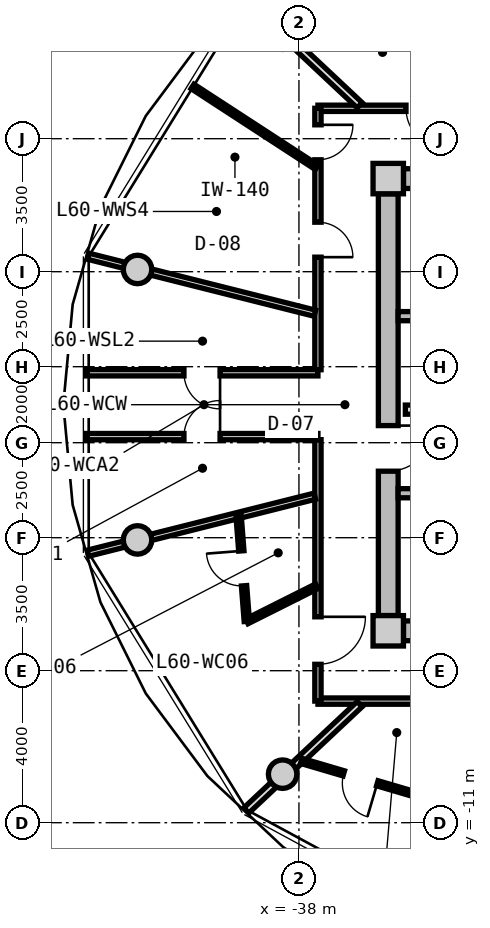
"""IFC4 building model, lengths in metres.
Left out: names, types, materials, properties, quantities, classifications, styles, units other than length and angle.
Written with IfcOpenShell. Run it as: python <this file> out.ifc"""

import sys

from ifc_helpers import new_model, si_unit, direction, frame, frame_2d, origin, origin_2d, place, context, subcontext, project, spatial, rectangle, circle, extrude, source, transform, mapped, element, fill, save


model = new_model("IFC4")
c1 = context("Model", 3, precision=1e-05, world=origin(), true_north=direction((0.0, 1.0)))
c2 = subcontext(c1, "Body", "Model", "MODEL_VIEW")
j1 = project(units=[si_unit("LENGTHUNIT", "METRE"), si_unit("PLANEANGLEUNIT", "RADIAN")], contexts=[c1])
p1 = place(None, origin())
s1 = spatial("IfcSite", under=j1, at=p1, CompositionType="ELEMENT")
p2 = place(p1, origin())
s2 = spatial("IfcBuilding", under=s1, at=p2, CompositionType="ELEMENT")
p3 = place(p2, frame((0.0, 0.0, 193.7)))
s3 = spatial("IfcBuildingStorey", under=s2, at=p3, CompositionType="ELEMENT", Elevation=193.7)
m1 = source(origin(), c2, "Body", "SweptSolid", [
    extrude(rectangle(XDim=0.8, YDim=0.8, at=origin_2d()), origin(), (0.0, 0.0, 1.0), 3.05),
])
for number, where, z_axis, x_axis in (
    (1, (-35.65, -5.95, 0.0), (0.0, 0.0, 1.0), (1.0, 0.0, 0.0)),
    (2, (-35.65, 5.95, 0.0), (0.0, 0.0, 1.0), (1.0, 0.0, 0.0)),
):
    element("IfcColumn", number, at=place(p3, frame(where, z_axis=z_axis, x_axis=x_axis)), inside=s3, PredefinedType="COLUMN", context=c2, shape_type="MappedRepresentation", body=[
        mapped(m1, transform((0.0, 0.0, 0.0), x_axis=(1.0, 0.0, 0.0), y_axis=(0.0, 1.0, 0.0), z_axis=(0.0, 0.0, 1.0), scale=1.0)),
    ])
m2 = source(origin(), c2, "Body", "SweptSolid", [
    extrude(rectangle(XDim=14.5, YDim=0.52, at=frame_2d((7.25, 0.0))), origin(), (0.0, 0.0, 1.0), 2.81),
])
for number, where, z_axis, x_axis in (
    (3, (-35.25, 5.95, 0.0), (0.0, 0.0, 1.0), (1.0, 0.0, 0.0)),
    (4, (-20.75, -5.95, 0.0), (0.0, 0.0, 1.0), (-1.0, 0.0, 0.0)),
):
    element("IfcWall", number, at=place(p3, frame(where, z_axis=z_axis, x_axis=x_axis)), inside=s3, PredefinedType="SHEAR", context=c2, shape_type="MappedRepresentation", body=[
        mapped(m2, transform((0.0, 0.0, 0.0), x_axis=(1.0, 0.0, 0.0), y_axis=(0.0, 1.0, 0.0), z_axis=(0.0, 0.0, 1.0), scale=1.0)),
    ])
m3 = source(origin(), c2, "Body", "SweptSolid", [
    extrude(rectangle(XDim=11.1, YDim=0.52, at=frame_2d((5.55, 0.0))), origin(), (0.0, 0.0, 1.0), 2.81),
])
p4 = place(p3, frame((-35.65, -5.55, 0.0), z_axis=(0.0, 0.0, 1.0), x_axis=(0.0, 1.0, 0.0)))
e5 = element("IfcWall", 5, at=p4, inside=s3, PredefinedType="SHEAR", context=c2, shape_type="MappedRepresentation", body=[
    mapped(m3, transform((0.0, 0.0, 0.0), x_axis=(1.0, 0.0, 0.0), y_axis=(0.0, 1.0, 0.0), z_axis=(0.0, 0.0, 1.0), scale=1.0)),
])
p5 = place(p4, frame((3.8, 0.0, 0.0)))
e6 = element("IfcOpeningElement", 6, at=p5, cuts=e5, PredefinedType="OPENING", context=c2, shape_type="SweptSolid", body=[
    extrude(rectangle(XDim=1.2, YDim=2.15, at=frame_2d((0.6, 1.075))), frame((0.0, 0.27, 0.0), z_axis=(0.0, -1.0, 0.0), x_axis=(1.0, 0.0, 0.0)), (0.0, 0.0, 1.0), 0.54),
])
m4 = source(origin(), c2, "Body", "SweptSolid", [
    extrude(circle(Radius=0.375, at=origin_2d()), origin(), (0.0, 0.0, 1.0), 3.05),
])
for number, where, z_axis, x_axis in (
    (7, (-42.247, 3.559, 0.0), (0.0, 0.0, 1.0), (1.0, 0.0, 0.0)),
    (8, (-42.247, -3.559, 0.0), (0.0, 0.0, 1.0), (1.0, 0.0, 0.0)),
    (9, (-38.43, -9.723, 0.0), (0.0, 0.0, 1.0), (1.0, 0.0, 0.0)),
):
    element("IfcColumn", number, at=place(p3, frame(where, z_axis=z_axis, x_axis=x_axis)), inside=s3, PredefinedType="COLUMN", context=c2, shape_type="MappedRepresentation", body=[
        mapped(m4, transform((0.0, 0.0, 0.0), x_axis=(1.0, 0.0, 0.0), y_axis=(0.0, 1.0, 0.0), z_axis=(0.0, 0.0, 1.0), scale=1.0)),
    ])
m5 = source(origin(), c2, "Body", "SweptSolid", [
    extrude(rectangle(XDim=7.93, YDim=0.24, at=frame_2d((3.965, 0.0))), origin(), (0.0, 0.0, 1.0), 2.81),
])
p6 = place(p3, frame((-35.39, 2.33, 0.0), z_axis=(0.0, 0.0, 1.0), x_axis=(1.0, 0.0, 0.0)))
e10 = element("IfcWall", 10, at=p6, inside=s3, PredefinedType="PARTITIONING", context=c2, shape_type="MappedRepresentation", body=[
    mapped(m5, transform((0.0, 0.0, 0.0), x_axis=(1.0, 0.0, 0.0), y_axis=(0.0, 1.0, 0.0), z_axis=(0.0, 0.0, 1.0), scale=1.0)),
])
p7 = place(p3, frame((-35.39, -2.33, 0.0), z_axis=(0.0, 0.0, 1.0), x_axis=(1.0, 0.0, 0.0)))
e11 = element("IfcWall", 11, at=p7, inside=s3, PredefinedType="PARTITIONING", context=c2, shape_type="MappedRepresentation", body=[
    mapped(m5, transform((0.0, 0.0, 0.0), x_axis=(1.0, 0.0, 0.0), y_axis=(0.0, 1.0, 0.0), z_axis=(0.0, 0.0, 1.0), scale=1.0)),
])
p8 = place(p7, frame((1.05, 0.0, 0.0)))
e12 = element("IfcOpeningElement", 12, at=p8, cuts=e11, PredefinedType="OPENING", context=c2, shape_type="SweptSolid", body=[
    extrude(rectangle(XDim=1.1, YDim=2.15, at=frame_2d((0.55, 1.075))), frame((0.0, 0.13, 0.0), z_axis=(0.0, -1.0, 0.0), x_axis=(1.0, 0.0, 0.0)), (0.0, 0.0, 1.0), 0.26),
])
m6 = source(origin(), c2, "Body", "SweptSolid", [
    extrude(rectangle(XDim=7.62, YDim=0.24, at=frame_2d((3.81, 0.0))), origin(), (0.0, 0.0, 1.0), 2.795),
])
p9 = place(p3, frame((-35.2, -0.13, 0.0), z_axis=(0.0, 0.0, 1.0), x_axis=(1.0, 0.0, 0.0)))
e13 = element("IfcWall", 13, at=p9, inside=s3, PredefinedType="PARTITIONING", context=c2, shape_type="MappedRepresentation", body=[
    mapped(m6, transform((0.0, 0.0, 0.0), x_axis=(1.0, 0.0, 0.0), y_axis=(0.0, 1.0, 0.0), z_axis=(0.0, 0.0, 1.0), scale=1.0)),
])
p10 = place(p9, frame((6.22, 0.0, 0.0)))
e14 = element("IfcOpeningElement", 14, at=p10, cuts=e13, PredefinedType="OPENING", context=c2, shape_type="SweptSolid", body=[
    extrude(rectangle(XDim=1.0, YDim=2.1, at=frame_2d((0.5, 1.05))), frame((0.0, 0.13, 0.0), z_axis=(0.0, -1.0, 0.0), x_axis=(1.0, 0.0, 0.0)), (0.0, 0.0, 1.0), 0.26),
])
p11 = place(p9, frame((2.4, 0.0, 0.0)))
e15 = element("IfcOpeningElement", 15, at=p11, cuts=e13, PredefinedType="OPENING", context=c2, shape_type="SweptSolid", body=[
    extrude(rectangle(XDim=1.0, YDim=2.1, at=frame_2d((0.5, 1.05))), frame((0.0, 0.13, 0.0), z_axis=(0.0, -1.0, 0.0), x_axis=(1.0, 0.0, 0.0)), (0.0, 0.0, 1.0), 0.26),
])
m7 = source(origin(), c2, "Body", "SweptSolid", [
    extrude(rectangle(XDim=8.58, YDim=0.165, at=frame_2d((4.29, 0.0))), origin(), (0.0, 0.0, 1.0), 2.795),
])
p12 = place(p3, frame((-37.5, 7.8, 0.0), z_axis=(0.0, 0.0, 1.0), x_axis=(1.0, 0.0, 0.0)))
e16 = element("IfcWall", 16, at=p12, inside=s3, PredefinedType="PARTITIONING", context=c2, shape_type="MappedRepresentation", body=[
    mapped(m7, transform((0.0, 0.0, 0.0), x_axis=(1.0, 0.0, 0.0), y_axis=(0.0, 1.0, 0.0), z_axis=(0.0, 0.0, 1.0), scale=1.0)),
])
p13 = place(p12, frame((5.408, 0.0, 0.0)))
e17 = element("IfcOpeningElement", 17, at=p13, cuts=e16, PredefinedType="OPENING", context=c2, shape_type="SweptSolid", body=[
    extrude(rectangle(XDim=1.05, YDim=2.15, at=frame_2d((0.525, 1.075))), frame((0.0, 0.093, 0.0), z_axis=(0.0, -1.0, 0.0), x_axis=(1.0, 0.0, 0.0)), (0.0, 0.0, 1.0), 0.185),
])
p14 = place(p12, frame((2.317, 0.0, 0.0)))
e18 = element("IfcOpeningElement", 18, at=p14, cuts=e16, PredefinedType="OPENING", context=c2, shape_type="SweptSolid", body=[
    extrude(rectangle(XDim=1.05, YDim=2.15, at=frame_2d((0.525, 1.075))), frame((0.0, 0.093, 0.0), z_axis=(0.0, -1.0, 0.0), x_axis=(1.0, 0.0, 0.0)), (0.0, 0.0, 1.0), 0.185),
])
m8 = source(origin(), c2, "Body", "SweptSolid", [
    extrude(rectangle(XDim=19.0, YDim=0.165, at=frame_2d((9.5, 0.0))), origin(), (0.0, 0.0, 1.0), 2.795),
])
p15 = place(p3, frame((-18.5, -7.8, 0.0), z_axis=(0.0, 0.0, 1.0), x_axis=(-1.0, 0.0, 0.0)))
e19 = element("IfcWall", 19, at=p15, inside=s3, PredefinedType="PARTITIONING", context=c2, shape_type="MappedRepresentation", body=[
    mapped(m8, transform((0.0, 0.0, 0.0), x_axis=(1.0, 0.0, 0.0), y_axis=(0.0, 1.0, 0.0), z_axis=(0.0, 0.0, 1.0), scale=1.0)),
])
p16 = place(p15, frame((12.569, 0.0, 0.0)))
e20 = element("IfcOpeningElement", 20, at=p16, cuts=e19, PredefinedType="OPENING", context=c2, shape_type="SweptSolid", body=[
    extrude(rectangle(XDim=1.25, YDim=2.2, at=frame_2d((0.625, 1.1))), frame((0.0, 0.093, 0.0), z_axis=(0.0, -1.0, 0.0), x_axis=(1.0, 0.0, 0.0)), (0.0, 0.0, 1.0), 0.185),
])
p17 = place(p15, frame((7.868, 0.0, 0.0)))
e21 = element("IfcOpeningElement", 21, at=p17, cuts=e19, PredefinedType="OPENING", context=c2, shape_type="SweptSolid", body=[
    extrude(rectangle(XDim=1.25, YDim=2.2, at=frame_2d((0.625, 1.1))), frame((0.0, 0.093, 0.0), z_axis=(0.0, -1.0, 0.0), x_axis=(1.0, 0.0, 0.0)), (0.0, 0.0, 1.0), 0.185),
])
p18 = place(p15, frame((3.559, 0.0, 0.0)))
e22 = element("IfcOpeningElement", 22, at=p18, cuts=e19, PredefinedType="OPENING", context=c2, shape_type="SweptSolid", body=[
    extrude(rectangle(XDim=1.25, YDim=2.2, at=frame_2d((0.625, 1.1))), frame((0.0, 0.093, 0.0), z_axis=(0.0, -1.0, 0.0), x_axis=(1.0, 0.0, 0.0)), (0.0, 0.0, 1.0), 0.185),
])
m9 = source(origin(), c2, "Body", "SweptSolid", [
    extrude(rectangle(XDim=6.88, YDim=0.165, at=frame_2d((3.44, 0.0))), origin(), (0.0, 0.0, 1.0), 2.795),
])
p19 = place(p3, frame((-37.5, -7.8, 0.0), z_axis=(0.0, 0.0, 1.0), x_axis=(0.0, 1.0, 0.0)))
e23 = element("IfcWall", 23, at=p19, inside=s3, PredefinedType="PARTITIONING", context=c2, shape_type="MappedRepresentation", body=[
    mapped(m9, transform((0.0, 0.0, 0.0), x_axis=(1.0, 0.0, 0.0), y_axis=(0.0, 1.0, 0.0), z_axis=(0.0, 0.0, 1.0), scale=1.0)),
])
p20 = place(p19, frame((0.968, 0.0, 0.0)))
e24 = element("IfcOpeningElement", 24, at=p20, cuts=e23, PredefinedType="OPENING", context=c2, shape_type="SweptSolid", body=[
    extrude(rectangle(XDim=1.25, YDim=2.2, at=frame_2d((0.625, 1.1))), frame((0.0, 0.093, 0.0), z_axis=(0.0, -1.0, 0.0), x_axis=(1.0, 0.0, 0.0)), (0.0, 0.0, 1.0), 0.185),
])
p21 = place(p3, frame((-37.5, 0.92, 0.0), z_axis=(0.0, 0.0, 1.0), x_axis=(0.0, 1.0, 0.0)))
e25 = element("IfcWall", 25, at=p21, inside=s3, PredefinedType="PARTITIONING", context=c2, shape_type="MappedRepresentation", body=[
    mapped(m9, transform((0.0, 0.0, 0.0), x_axis=(1.0, 0.0, 0.0), y_axis=(0.0, 1.0, 0.0), z_axis=(0.0, 0.0, 1.0), scale=1.0)),
])
p22 = place(p21, frame((5.525, 0.0, 0.0)))
e26 = element("IfcOpeningElement", 26, at=p22, cuts=e25, PredefinedType="OPENING", context=c2, shape_type="SweptSolid", body=[
    extrude(rectangle(XDim=0.92, YDim=2.1, at=frame_2d((0.46, 1.05))), frame((0.0, 0.093, 0.0), z_axis=(0.0, -1.0, 0.0), x_axis=(1.0, 0.0, 0.0)), (0.0, 0.0, 1.0), 0.185),
])
p23 = place(p21, frame((2.962, 0.0, 0.0)))
e27 = element("IfcOpeningElement", 27, at=p23, cuts=e25, PredefinedType="OPENING", context=c2, shape_type="SweptSolid", body=[
    extrude(rectangle(XDim=0.92, YDim=2.1, at=frame_2d((0.46, 1.05))), frame((0.0, 0.093, 0.0), z_axis=(0.0, -1.0, 0.0), x_axis=(1.0, 0.0, 0.0)), (0.0, 0.0, 1.0), 0.185),
])
m10 = source(origin(), c2, "Body", "SweptSolid", [
    extrude(rectangle(XDim=6.157, YDim=0.165, at=frame_2d((3.079, 0.0))), origin(), (0.0, 0.0, 1.0), 2.395),
])
for number, where, z_axis, x_axis in (
    (28, (-37.58, 2.407, 0.0), (0.0, 0.0, 1.0), (-0.97, 0.244, 0.0)),
    (29, (-37.58, -2.407, 0.0), (0.0, 0.0, 1.0), (-0.97, -0.244, 0.0)),
):
    element("IfcWall", number, at=place(p3, frame(where, z_axis=z_axis, x_axis=x_axis)), inside=s3, PredefinedType="PARTITIONING", context=c2, shape_type="MappedRepresentation", body=[
        mapped(m10, transform((0.0, 0.0, 0.0), x_axis=(1.0, 0.0, 0.0), y_axis=(0.0, 1.0, 0.0), z_axis=(0.0, 0.0, 1.0), scale=1.0)),
    ])
m11 = source(origin(), c2, "Body", "SweptSolid", [
    extrude(rectangle(XDim=6.101, YDim=0.165, at=frame_2d((3.051, 0.0))), origin(), (0.0, 0.0, 1.0), 2.795),
])
p24 = place(p3, frame((-43.601, 0.84, 0.0), z_axis=(0.0, 0.0, 1.0), x_axis=(1.0, 0.0, 0.0)))
e30 = element("IfcWall", 30, at=p24, inside=s3, PredefinedType="PARTITIONING", context=c2, shape_type="MappedRepresentation", body=[
    mapped(m11, transform((0.0, 0.0, 0.0), x_axis=(1.0, 0.0, 0.0), y_axis=(0.0, 1.0, 0.0), z_axis=(0.0, 0.0, 1.0), scale=1.0)),
])
p25 = place(p24, frame((2.576, 0.0, 0.0)))
e31 = element("IfcOpeningElement", 31, at=p25, cuts=e30, PredefinedType="OPENING", context=c2, shape_type="SweptSolid", body=[
    extrude(rectangle(XDim=0.95, YDim=2.1, at=frame_2d((0.475, 1.05))), frame((0.0, 0.093, 0.0), z_axis=(0.0, -1.0, 0.0), x_axis=(1.0, 0.0, 0.0)), (0.0, 0.0, 1.0), 0.185),
])
p26 = place(p3, frame((-37.5, -0.84, 0.0), z_axis=(0.0, 0.0, 1.0), x_axis=(-1.0, 0.0, 0.0)))
e32 = element("IfcWall", 32, at=p26, inside=s3, PredefinedType="PARTITIONING", context=c2, shape_type="MappedRepresentation", body=[
    mapped(m11, transform((0.0, 0.0, 0.0), x_axis=(1.0, 0.0, 0.0), y_axis=(0.0, 1.0, 0.0), z_axis=(0.0, 0.0, 1.0), scale=1.0)),
])
p27 = place(p26, frame((2.576, 0.0, 0.0)))
e33 = element("IfcOpeningElement", 33, at=p27, cuts=e32, PredefinedType="OPENING", context=c2, shape_type="SweptSolid", body=[
    extrude(rectangle(XDim=0.95, YDim=2.1, at=frame_2d((0.475, 1.05))), frame((0.0, 0.093, 0.0), z_axis=(0.0, -1.0, 0.0), x_axis=(1.0, 0.0, 0.0)), (0.0, 0.0, 1.0), 0.185),
])
m12 = source(origin(), c2, "Body", "SweptSolid", [
    extrude(rectangle(XDim=4.089, YDim=0.19, at=frame_2d((2.044, 0.0))), origin(), (0.0, 0.0, 1.0), 2.395),
])
p28 = place(p3, frame((-36.402, 7.88, 0.0), z_axis=(0.0, 0.0, 1.0), x_axis=(-0.729401273609, 0.684086092577, 0.0)))
e34 = element("IfcWall", 34, at=p28, inside=s3, PredefinedType="PARTITIONING", context=c2, shape_type="MappedRepresentation", body=[
    mapped(m12, transform((0.0, 0.0, 0.0), x_axis=(1.0, 0.0, 0.0), y_axis=(0.0, 1.0, 0.0), z_axis=(0.0, 0.0, 1.0), scale=1.0)),
])
m13 = source(origin(), c2, "Body", "SweptSolid", [
    extrude(rectangle(XDim=5.652, YDim=0.19, at=frame_2d((2.826, 0.0))), origin(), (0.0, 0.0, 1.0), 2.795),
])
p29 = place(p3, frame((-32.794, 7.83, 0.0), z_axis=(0.0, 0.0, 1.0), x_axis=(-0.527566076956, 0.84951399897, 0.0)))
e35 = element("IfcWall", 35, at=p29, inside=s3, PredefinedType="PARTITIONING", context=c2, shape_type="MappedRepresentation", body=[
    mapped(m13, transform((0.0, 0.0, 0.0), x_axis=(1.0, 0.0, 0.0), y_axis=(0.0, 1.0, 0.0), z_axis=(0.0, 0.0, 1.0), scale=1.0)),
])
m14 = source(origin(), c2, "Body", "SweptSolid", [
    extrude(rectangle(XDim=3.904, YDim=0.14, at=frame_2d((1.952, 0.0))), origin(), (0.0, 0.0, 1.0), 2.795),
])
p30 = place(p3, frame((-37.53, 6.246, 0.0), z_axis=(0.0, 0.0, 1.0), x_axis=(-0.838024687996, 0.545632314209, 0.0)))
e36 = element("IfcWall", 36, at=p30, inside=s3, PredefinedType="PARTITIONING", context=c2, shape_type="MappedRepresentation", body=[
    mapped(m14, transform((0.0, 0.0, 0.0), x_axis=(1.0, 0.0, 0.0), y_axis=(0.0, 1.0, 0.0), z_axis=(0.0, 0.0, 1.0), scale=1.0)),
])
p31 = place(p3, frame((-36.402, -7.88, 0.0), z_axis=(0.0, 0.0, 1.0), x_axis=(-0.729401273609, -0.684086092577, 0.0)))
e37 = element("IfcWall", 37, at=p31, inside=s3, PredefinedType="PARTITIONING", context=c2, shape_type="MappedRepresentation", body=[
    mapped(m12, transform((0.0, 0.0, 0.0), x_axis=(1.0, 0.0, 0.0), y_axis=(0.0, 1.0, 0.0), z_axis=(0.0, 0.0, 1.0), scale=1.0)),
])
m15 = source(origin(), c2, "Body", "SweptSolid", [
    extrude(rectangle(XDim=2.06, YDim=0.14, at=frame_2d((1.03, 0.0))), origin(), (0.0, 0.0, 1.0), 2.795),
])
p32 = place(p3, frame((-37.53, -4.778, 0.0), z_axis=(0.0, 0.0, 1.0), x_axis=(-0.893952568722, -0.448161583444, 0.0)))
e38 = element("IfcWall", 38, at=p32, inside=s3, PredefinedType="PARTITIONING", context=c2, shape_type="MappedRepresentation", body=[
    mapped(m15, transform((0.0, 0.0, 0.0), x_axis=(1.0, 0.0, 0.0), y_axis=(0.0, 1.0, 0.0), z_axis=(0.0, 0.0, 1.0), scale=1.0)),
])
m16 = source(origin(), c2, "Body", "SweptSolid", [
    extrude(rectangle(XDim=2.798, YDim=0.14, at=frame_2d((1.399, 0.0))), origin(), (0.0, 0.0, 1.0), 2.795),
])
p33 = place(p3, frame((-39.371, -5.701, 0.0), z_axis=(0.0, 0.0, 1.0), x_axis=(-0.077823984089, 0.996967114553, 0.0)))
e39 = element("IfcWall", 39, at=p33, inside=s3, PredefinedType="PARTITIONING", context=c2, shape_type="MappedRepresentation", body=[
    mapped(m16, transform((0.0, 0.0, 0.0), x_axis=(1.0, 0.0, 0.0), y_axis=(0.0, 1.0, 0.0), z_axis=(0.0, 0.0, 1.0), scale=1.0)),
])
p34 = place(p33, frame((0.939, 0.0, 0.0)))
e40 = element("IfcOpeningElement", 40, at=p34, cuts=e39, PredefinedType="OPENING", context=c2, shape_type="SweptSolid", body=[
    extrude(rectangle(XDim=0.92, YDim=2.1, at=frame_2d((0.46, 1.05))), frame((0.0, 0.08, 0.0), z_axis=(0.0, -1.0, 0.0), x_axis=(1.0, 0.0, 0.0)), (0.0, 0.0, 1.0), 0.16),
])
m17 = source(origin(), c2, "Body", "SweptSolid", [
    extrude(rectangle(XDim=3.252, YDim=0.14, at=frame_2d((1.626, 0.0))), origin(), (0.0, 0.0, 1.0), 2.795),
])
p35 = place(p3, frame((-34.82, -10.291, 0.0), z_axis=(0.0, 0.0, 1.0), x_axis=(-0.959294945864, 0.282406102695, 0.0)))
e41 = element("IfcWall", 41, at=p35, inside=s3, PredefinedType="PARTITIONING", context=c2, shape_type="MappedRepresentation", body=[
    mapped(m17, transform((0.0, 0.0, 0.0), x_axis=(1.0, 0.0, 0.0), y_axis=(0.0, 1.0, 0.0), z_axis=(0.0, 0.0, 1.0), scale=1.0)),
])
p36 = place(p35, frame((1.166, 0.0, 0.0)))
e42 = element("IfcOpeningElement", 42, at=p36, cuts=e41, PredefinedType="OPENING", context=c2, shape_type="SweptSolid", body=[
    extrude(rectangle(XDim=0.92, YDim=2.1, at=frame_2d((0.46, 1.05))), frame((0.0, 0.08, 0.0), z_axis=(0.0, -1.0, 0.0), x_axis=(1.0, 0.0, 0.0)), (0.0, 0.0, 1.0), 0.16),
])
m18 = source(origin(), c2, "Body", "SweptSolid", [
    extrude(rectangle(XDim=1.2, YDim=2.15, at=frame_2d((0.6, 1.075))), frame((0.0, 0.025, 0.0), z_axis=(0.0, -1.0, 0.0), x_axis=(1.0, 0.0, 0.0)), (0.0, 0.0, 1.0), 0.05),
])
p37 = place(p5, frame((1.2, 0.0, 0.0), z_axis=(0.0, 0.0, 1.0), x_axis=(-1.0, 0.0, 0.0)))
e43 = element("IfcDoor", 43, at=p37, inside=s3, OperationType="SINGLE_SWING_LEFT", PredefinedType="DOOR", context=c2, shape_type="MappedRepresentation", body=[
    mapped(m18, transform((0.0, 0.0, 0.0), x_axis=(1.0, 0.0, 0.0), y_axis=(0.0, 1.0, 0.0), z_axis=(0.0, 0.0, 1.0), scale=1.0)),
])
fill(e6, e43)
m19 = source(origin(), c2, "Body", "SweptSolid", [
    extrude(rectangle(XDim=0.95, YDim=2.1, at=frame_2d((0.475, 1.05))), frame((0.0, 0.025, 0.0), z_axis=(0.0, -1.0, 0.0), x_axis=(1.0, 0.0, 0.0)), (0.0, 0.0, 1.0), 0.05),
])
p38 = place(p27, frame((0.95, 0.0, 0.0), z_axis=(0.0, 0.0, 1.0), x_axis=(-1.0, 0.0, 0.0)))
e44 = element("IfcDoor", 44, at=p38, inside=s3, OperationType="SINGLE_SWING_RIGHT", PredefinedType="DOOR", context=c2, shape_type="MappedRepresentation", body=[
    mapped(m19, transform((0.0, 0.0, 0.0), x_axis=(1.0, 0.0, 0.0), y_axis=(0.0, 1.0, 0.0), z_axis=(0.0, 0.0, 1.0), scale=1.0)),
])
fill(e33, e44)
p39 = place(p25, frame((0.95, 0.0, 0.0), z_axis=(0.0, 0.0, 1.0), x_axis=(-1.0, 0.0, 0.0)))
e45 = element("IfcDoor", 45, at=p39, inside=s3, OperationType="SINGLE_SWING_LEFT", PredefinedType="DOOR", context=c2, shape_type="MappedRepresentation", body=[
    mapped(m19, transform((0.0, 0.0, 0.0), x_axis=(1.0, 0.0, 0.0), y_axis=(0.0, 1.0, 0.0), z_axis=(0.0, 0.0, 1.0), scale=1.0)),
])
fill(e31, e45)
m20 = source(origin(), c2, "Body", "SweptSolid", [
    extrude(rectangle(XDim=1.05, YDim=2.15, at=frame_2d((0.525, 1.075))), frame((0.0, 0.025, 0.0), z_axis=(0.0, -1.0, 0.0), x_axis=(1.0, 0.0, 0.0)), (0.0, 0.0, 1.0), 0.05),
])
p40 = place(p14, frame((1.05, 0.0, 0.0), z_axis=(0.0, 0.0, 1.0), x_axis=(-1.0, 0.0, 0.0)))
e46 = element("IfcDoor", 46, at=p40, inside=s3, OperationType="SINGLE_SWING_LEFT", PredefinedType="DOOR", context=c2, shape_type="MappedRepresentation", body=[
    mapped(m20, transform((0.0, 0.0, 0.0), x_axis=(1.0, 0.0, 0.0), y_axis=(0.0, 1.0, 0.0), z_axis=(0.0, 0.0, 1.0), scale=1.0)),
])
fill(e18, e46)
m21 = source(origin(), c2, "Body", "SweptSolid", [
    extrude(rectangle(XDim=0.92, YDim=2.1, at=frame_2d((0.46, 1.05))), frame((0.0, 0.025, 0.0), z_axis=(0.0, -1.0, 0.0), x_axis=(1.0, 0.0, 0.0)), (0.0, 0.0, 1.0), 0.05),
])
p41 = place(p22, frame((0.92, 0.0, 0.0), z_axis=(0.0, 0.0, 1.0), x_axis=(-1.0, 0.0, 0.0)))
e47 = element("IfcDoor", 47, at=p41, inside=s3, OperationType="SINGLE_SWING_LEFT", PredefinedType="DOOR", context=c2, shape_type="MappedRepresentation", body=[
    mapped(m21, transform((0.0, 0.0, 0.0), x_axis=(1.0, 0.0, 0.0), y_axis=(0.0, 1.0, 0.0), z_axis=(0.0, 0.0, 1.0), scale=1.0)),
])
fill(e26, e47)
p42 = place(p23, frame((0.92, 0.0, 0.0), z_axis=(0.0, 0.0, 1.0), x_axis=(-1.0, 0.0, 0.0)))
e48 = element("IfcDoor", 48, at=p42, inside=s3, OperationType="SINGLE_SWING_RIGHT", PredefinedType="DOOR", context=c2, shape_type="MappedRepresentation", body=[
    mapped(m21, transform((0.0, 0.0, 0.0), x_axis=(1.0, 0.0, 0.0), y_axis=(0.0, 1.0, 0.0), z_axis=(0.0, 0.0, 1.0), scale=1.0)),
])
fill(e27, e48)
m22 = source(origin(), c2, "Body", "SweptSolid", [
    extrude(rectangle(XDim=1.25, YDim=2.2, at=frame_2d((0.625, 1.1))), frame((0.0, 0.025, 0.0), z_axis=(0.0, -1.0, 0.0), x_axis=(1.0, 0.0, 0.0)), (0.0, 0.0, 1.0), 0.05),
])
p43 = place(p20, frame((1.25, 0.0, 0.0), z_axis=(0.0, 0.0, 1.0), x_axis=(-1.0, 0.0, 0.0)))
e49 = element("IfcDoor", 49, at=p43, inside=s3, OperationType="SINGLE_SWING_LEFT", PredefinedType="DOOR", context=c2, shape_type="MappedRepresentation", body=[
    mapped(m22, transform((0.0, 0.0, 0.0), x_axis=(1.0, 0.0, 0.0), y_axis=(0.0, 1.0, 0.0), z_axis=(0.0, 0.0, 1.0), scale=1.0)),
])
fill(e24, e49)
p44 = place(p34, origin())
e50 = element("IfcDoor", 50, at=p44, inside=s3, OperationType="SINGLE_SWING_RIGHT", PredefinedType="DOOR", context=c2, shape_type="MappedRepresentation", body=[
    mapped(m21, transform((0.0, 0.0, 0.0), x_axis=(1.0, 0.0, 0.0), y_axis=(0.0, 1.0, 0.0), z_axis=(0.0, 0.0, 1.0), scale=1.0)),
])
fill(e40, e50)
p45 = place(p36, origin())
e51 = element("IfcDoor", 51, at=p45, inside=s3, OperationType="SINGLE_SWING_LEFT", PredefinedType="DOOR", context=c2, shape_type="MappedRepresentation", body=[
    mapped(m21, transform((0.0, 0.0, 0.0), x_axis=(1.0, 0.0, 0.0), y_axis=(0.0, 1.0, 0.0), z_axis=(0.0, 0.0, 1.0), scale=1.0)),
])
fill(e42, e51)
save(model, sys.argv[1])
